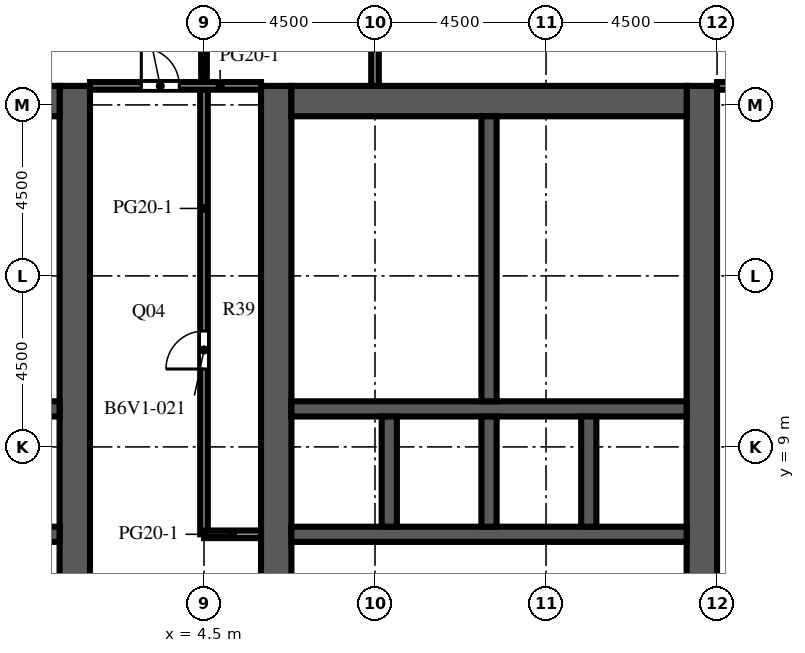
"""IFC4 building model, lengths in metres.
Left out: names, types, materials, properties, quantities, classifications, styles, units other than length and angle.
Written with IfcOpenShell. Run it as: python <this file> out.ifc"""

import sys

from ifc_helpers import new_model, si_unit, direction, frame, frame_2d, origin, place, context, subcontext, project, spatial, rectangle, extrude, element, fill, save


model = new_model("IFC4")
c1 = context("Model", 3, precision=1e-05, world=origin(), true_north=direction((0.0, 1.0)))
c2 = subcontext(c1, "Body", "Model", "MODEL_VIEW")
j1 = project(units=[si_unit("LENGTHUNIT", "METRE"), si_unit("PLANEANGLEUNIT", "RADIAN")], contexts=[c1])
p1 = place(None, origin())
s1 = spatial("IfcSite", under=j1, at=p1, CompositionType="ELEMENT")
p2 = place(p1, origin())
s2 = spatial("IfcBuilding", under=s1, at=p2, CompositionType="ELEMENT")
p3 = place(p2, frame((0.0, 0.0, 203.8)))
s3 = spatial("IfcBuildingStorey", under=s2, at=p3, CompositionType="ELEMENT", Elevation=203.8)
p4 = place(p3, frame((1.1, -9.0, 0.0), z_axis=(0.0, 0.0, 1.0), x_axis=(0.0, 1.0, 0.0)))
e1 = element("IfcWall", 1, at=p4, inside=s3, PredefinedType="SHEAR", context=c2, shape_type="SweptSolid", body=[
    extrude(rectangle(XDim=27.5, YDim=0.8, at=frame_2d((13.75, 0.0))), origin(), (0.0, 0.0, 1.0), 4.1),
])
p5 = place(p4, frame((12.55, 0.0, 0.0)))
e2 = element("IfcOpeningElement", 2, at=p5, cuts=e1, PredefinedType="OPENING", context=c2, shape_type="SweptSolid", body=[
    extrude(rectangle(XDim=2.4, YDim=2.4, at=frame_2d((1.2, 1.2))), frame((0.0, 0.41, 0.0), z_axis=(0.0, -1.0, 0.0), x_axis=(1.0, 0.0, 0.0)), (0.0, 0.0, 1.0), 0.82),
])
p6 = place(p4, frame((3.95, 0.0, 0.0)))
e3 = element("IfcOpeningElement", 3, at=p6, cuts=e1, PredefinedType="OPENING", context=c2, shape_type="SweptSolid", body=[
    extrude(rectangle(XDim=1.2, YDim=2.1, at=frame_2d((0.6, 1.05))), frame((0.0, 0.41, 0.0), z_axis=(0.0, -1.0, 0.0), x_axis=(1.0, 0.0, 0.0)), (0.0, 0.0, 1.0), 0.82),
])
p7 = place(p4, frame((22.35, 0.0, 0.0)))
e4 = element("IfcOpeningElement", 4, at=p7, cuts=e1, PredefinedType="OPENING", context=c2, shape_type="SweptSolid", body=[
    extrude(rectangle(XDim=1.2, YDim=2.1, at=frame_2d((0.6, 1.05))), frame((0.0, 0.41, 0.0), z_axis=(0.0, -1.0, 0.0), x_axis=(1.0, 0.0, 0.0)), (0.0, 0.0, 1.0), 0.82),
])
p8 = place(p3, frame((-9.7, 18.1, 0.0), z_axis=(0.0, 0.0, 1.0), x_axis=(1.0, 0.0, 0.0)))
e5 = element("IfcWall", 5, at=p8, inside=s3, PredefinedType="SHEAR", context=c2, shape_type="SweptSolid", body=[
    extrude(rectangle(XDim=10.4, YDim=0.8, at=frame_2d((5.2, 0.0))), origin(), (0.0, 0.0, 1.0), 4.1),
])
p9 = place(p3, frame((-9.7, 6.7, 0.0), z_axis=(0.0, 0.0, 1.0), x_axis=(1.0, 0.0, 0.0)))
e6 = element("IfcWall", 6, at=p9, inside=s3, PredefinedType="SHEAR", context=c2, shape_type="SweptSolid", body=[
    extrude(rectangle(XDim=10.4, YDim=0.4, at=frame_2d((5.2, 0.0))), origin(), (0.0, 0.0, 1.0), 4.1),
])
p10 = place(p9, frame((3.337, 0.0, 0.0)))
e7 = element("IfcOpeningElement", 7, at=p10, cuts=e6, PredefinedType="OPENING", context=c2, shape_type="SweptSolid", body=[
    extrude(rectangle(XDim=1.1, YDim=2.1, at=frame_2d((0.55, 1.05))), frame((0.0, 0.21, 0.0), z_axis=(0.0, -1.0, 0.0), x_axis=(1.0, 0.0, 0.0)), (0.0, 0.0, 1.0), 0.42),
])
p11 = place(p9, frame((5.962, 0.0, 0.0)))
e8 = element("IfcOpeningElement", 8, at=p11, cuts=e6, PredefinedType="OPENING", context=c2, shape_type="SweptSolid", body=[
    extrude(rectangle(XDim=1.1, YDim=2.1, at=frame_2d((0.55, 1.05))), frame((0.0, 0.21, 0.0), z_axis=(0.0, -1.0, 0.0), x_axis=(1.0, 0.0, 0.0)), (0.0, 0.0, 1.0), 0.42),
])
p12 = place(p9, frame((8.663, 0.0, 0.0)))
e9 = element("IfcOpeningElement", 9, at=p12, cuts=e6, PredefinedType="OPENING", context=c2, shape_type="SweptSolid", body=[
    extrude(rectangle(XDim=1.1, YDim=2.1, at=frame_2d((0.55, 1.05))), frame((0.0, 0.21, 0.0), z_axis=(0.0, -1.0, 0.0), x_axis=(1.0, 0.0, 0.0)), (0.0, 0.0, 1.0), 0.42),
])
p13 = place(p9, frame((0.688, 0.0, 0.0)))
e10 = element("IfcOpeningElement", 10, at=p13, cuts=e6, PredefinedType="OPENING", context=c2, shape_type="SweptSolid", body=[
    extrude(rectangle(XDim=1.0, YDim=2.1, at=frame_2d((0.5, 1.05))), frame((0.0, 0.21, 0.0), z_axis=(0.0, -1.0, 0.0), x_axis=(1.0, 0.0, 0.0)), (0.0, 0.0, 1.0), 0.42),
])
p14 = place(p3, frame((-9.7, 10.0, 0.0), z_axis=(0.0, 0.0, 1.0), x_axis=(1.0, 0.0, 0.0)))
e11 = element("IfcWall", 11, at=p14, inside=s3, PredefinedType="SHEAR", context=c2, shape_type="SweptSolid", body=[
    extrude(rectangle(XDim=10.4, YDim=0.4, at=frame_2d((5.2, 0.0))), origin(), (0.0, 0.0, 1.0), 4.1),
])
p15 = place(p3, frame((6.4, -9.0, 0.0), z_axis=(0.0, 0.0, 1.0), x_axis=(0.0, 1.0, 0.0)))
e12 = element("IfcWall", 12, at=p15, inside=s3, PredefinedType="SHEAR", context=c2, shape_type="SweptSolid", body=[
    extrude(rectangle(XDim=27.5, YDim=0.8, at=frame_2d((13.75, 0.0))), origin(), (0.0, 0.0, 1.0), 4.1),
])
p16 = place(p15, frame((12.55, 0.0, 0.0)))
e13 = element("IfcOpeningElement", 13, at=p16, cuts=e12, PredefinedType="OPENING", context=c2, shape_type="SweptSolid", body=[
    extrude(rectangle(XDim=2.4, YDim=2.4, at=frame_2d((1.2, 1.2))), frame((0.0, 0.41, 0.0), z_axis=(0.0, -1.0, 0.0), x_axis=(1.0, 0.0, 0.0)), (0.0, 0.0, 1.0), 0.82),
])
p17 = place(p15, frame((3.95, 0.0, 0.0)))
e14 = element("IfcOpeningElement", 14, at=p17, cuts=e12, PredefinedType="OPENING", context=c2, shape_type="SweptSolid", body=[
    extrude(rectangle(XDim=1.2, YDim=2.1, at=frame_2d((0.6, 1.05))), frame((0.0, 0.41, 0.0), z_axis=(0.0, -1.0, 0.0), x_axis=(1.0, 0.0, 0.0)), (0.0, 0.0, 1.0), 0.82),
])
p18 = place(p15, frame((22.35, 0.0, 0.0)))
e15 = element("IfcOpeningElement", 15, at=p18, cuts=e12, PredefinedType="OPENING", context=c2, shape_type="SweptSolid", body=[
    extrude(rectangle(XDim=1.2, YDim=2.1, at=frame_2d((0.6, 1.05))), frame((0.0, 0.41, 0.0), z_axis=(0.0, -1.0, 0.0), x_axis=(1.0, 0.0, 0.0)), (0.0, 0.0, 1.0), 0.82),
])
p19 = place(p3, frame((17.6, -9.0, 0.0), z_axis=(0.0, 0.0, 1.0), x_axis=(0.0, 1.0, 0.0)))
e16 = element("IfcWall", 16, at=p19, inside=s3, PredefinedType="SHEAR", context=c2, shape_type="SweptSolid", body=[
    extrude(rectangle(XDim=27.5, YDim=0.8, at=frame_2d((13.75, 0.0))), origin(), (0.0, 0.0, 1.0), 4.1),
])
p20 = place(p19, frame((12.55, 0.0, 0.0)))
e17 = element("IfcOpeningElement", 17, at=p20, cuts=e16, PredefinedType="OPENING", context=c2, shape_type="SweptSolid", body=[
    extrude(rectangle(XDim=2.4, YDim=2.4, at=frame_2d((1.2, 1.2))), frame((0.0, 0.41, 0.0), z_axis=(0.0, -1.0, 0.0), x_axis=(1.0, 0.0, 0.0)), (0.0, 0.0, 1.0), 0.82),
])
p21 = place(p19, frame((6.825, 0.0, 0.0)))
e18 = element("IfcOpeningElement", 18, at=p21, cuts=e16, PredefinedType="OPENING", context=c2, shape_type="SweptSolid", body=[
    extrude(rectangle(XDim=1.2, YDim=2.1, at=frame_2d((0.6, 1.05))), frame((0.0, 0.41, 0.0), z_axis=(0.0, -1.0, 0.0), x_axis=(1.0, 0.0, 0.0)), (0.0, 0.0, 1.0), 0.82),
])
p22 = place(p19, frame((19.475, 0.0, 0.0)))
e19 = element("IfcOpeningElement", 19, at=p22, cuts=e16, PredefinedType="OPENING", context=c2, shape_type="SweptSolid", body=[
    extrude(rectangle(XDim=1.2, YDim=2.1, at=frame_2d((0.6, 1.05))), frame((0.0, 0.41, 0.0), z_axis=(0.0, -1.0, 0.0), x_axis=(1.0, 0.0, 0.0)), (0.0, 0.0, 1.0), 0.82),
])
p23 = place(p3, frame((6.8, 18.1, 0.0), z_axis=(0.0, 0.0, 1.0), x_axis=(1.0, 0.0, 0.0)))
e20 = element("IfcWall", 20, at=p23, inside=s3, PredefinedType="SHEAR", context=c2, shape_type="SweptSolid", body=[
    extrude(rectangle(XDim=10.4, YDim=0.8, at=frame_2d((5.2, 0.0))), origin(), (0.0, 0.0, 1.0), 4.1),
])
p24 = place(p3, frame((6.8, 6.7, 0.0), z_axis=(0.0, 0.0, 1.0), x_axis=(1.0, 0.0, 0.0)))
e21 = element("IfcWall", 21, at=p24, inside=s3, PredefinedType="SHEAR", context=c2, shape_type="SweptSolid", body=[
    extrude(rectangle(XDim=10.4, YDim=0.4, at=frame_2d((5.2, 0.0))), origin(), (0.0, 0.0, 1.0), 4.1),
])
p25 = place(p24, frame((3.337, 0.0, 0.0)))
e22 = element("IfcOpeningElement", 22, at=p25, cuts=e21, PredefinedType="OPENING", context=c2, shape_type="SweptSolid", body=[
    extrude(rectangle(XDim=1.1, YDim=2.1, at=frame_2d((0.55, 1.05))), frame((0.0, 0.21, 0.0), z_axis=(0.0, -1.0, 0.0), x_axis=(1.0, 0.0, 0.0)), (0.0, 0.0, 1.0), 0.42),
])
p26 = place(p24, frame((5.962, 0.0, 0.0)))
e23 = element("IfcOpeningElement", 23, at=p26, cuts=e21, PredefinedType="OPENING", context=c2, shape_type="SweptSolid", body=[
    extrude(rectangle(XDim=1.1, YDim=2.1, at=frame_2d((0.55, 1.05))), frame((0.0, 0.21, 0.0), z_axis=(0.0, -1.0, 0.0), x_axis=(1.0, 0.0, 0.0)), (0.0, 0.0, 1.0), 0.42),
])
p27 = place(p24, frame((8.663, 0.0, 0.0)))
e24 = element("IfcOpeningElement", 24, at=p27, cuts=e21, PredefinedType="OPENING", context=c2, shape_type="SweptSolid", body=[
    extrude(rectangle(XDim=1.1, YDim=2.1, at=frame_2d((0.55, 1.05))), frame((0.0, 0.21, 0.0), z_axis=(0.0, -1.0, 0.0), x_axis=(1.0, 0.0, 0.0)), (0.0, 0.0, 1.0), 0.42),
])
p28 = place(p24, frame((0.688, 0.0, 0.0)))
e25 = element("IfcOpeningElement", 25, at=p28, cuts=e21, PredefinedType="OPENING", context=c2, shape_type="SweptSolid", body=[
    extrude(rectangle(XDim=1.0, YDim=2.1, at=frame_2d((0.5, 1.05))), frame((0.0, 0.21, 0.0), z_axis=(0.0, -1.0, 0.0), x_axis=(1.0, 0.0, 0.0)), (0.0, 0.0, 1.0), 0.42),
])
p29 = place(p3, frame((6.8, 10.0, 0.0), z_axis=(0.0, 0.0, 1.0), x_axis=(1.0, 0.0, 0.0)))
e26 = element("IfcWall", 26, at=p29, inside=s3, PredefinedType="SHEAR", context=c2, shape_type="SweptSolid", body=[
    extrude(rectangle(XDim=10.4, YDim=0.4, at=frame_2d((5.2, 0.0))), origin(), (0.0, 0.0, 1.0), 4.1),
])
for number, where, z_axis, x_axis in (
    (27, (9.375, 6.9, 0.0), (0.0, 0.0, 1.0), (0.0, 1.0, 0.0)),
    (28, (12.0, 6.9, 0.0), (0.0, 0.0, 1.0), (0.0, 1.0, 0.0)),
    (29, (14.625, 6.9, 0.0), (0.0, 0.0, 1.0), (0.0, 1.0, 0.0)),
):
    element("IfcWall", number, at=place(p3, frame(where, z_axis=z_axis, x_axis=x_axis)), inside=s3, PredefinedType="SHEAR", context=c2, shape_type="SweptSolid", body=[
        extrude(rectangle(XDim=2.9, YDim=0.4, at=frame_2d((1.45, 0.0))), origin(), (0.0, 0.0, 1.0), 4.1),
    ])
p30 = place(p3, frame((12.0, 10.2, 0.0), z_axis=(0.0, 0.0, 1.0), x_axis=(0.0, 1.0, 0.0)))
e30 = element("IfcWall", 30, at=p30, inside=s3, PredefinedType="SHEAR", context=c2, shape_type="SweptSolid", body=[
    extrude(rectangle(XDim=7.5, YDim=0.4, at=frame_2d((3.75, 0.0))), origin(), (0.0, 0.0, 1.0), 4.1),
])
p31 = place(p3, frame((8.2, 10.2, 0.0), z_axis=(0.0, 0.0, 1.0), x_axis=(0.0, 1.0, 0.0)))
e31 = element("IfcWall", 31, at=p31, inside=s3, PredefinedType="PARTITIONING", context=c2, shape_type="SweptSolid", body=[
    extrude(rectangle(XDim=2.25, YDim=0.1, at=frame_2d((1.125, 0.0))), origin(), (0.0, 0.0, 1.0), 3.65),
])
p32 = place(p31, frame((0.625, 0.0, 0.0)))
e32 = element("IfcOpeningElement", 32, at=p32, cuts=e31, PredefinedType="OPENING", context=c2, shape_type="SweptSolid", body=[
    extrude(rectangle(XDim=1.0, YDim=2.1, at=frame_2d((0.5, 1.05))), frame((0.0, 0.06, 0.0), z_axis=(0.0, -1.0, 0.0), x_axis=(1.0, 0.0, 0.0)), (0.0, 0.0, 1.0), 0.12),
])
p33 = place(p3, frame((8.2, 12.45, 0.0), z_axis=(0.0, 0.0, 1.0), x_axis=(0.0, 1.0, 0.0)))
e33 = element("IfcWall", 33, at=p33, inside=s3, PredefinedType="PARTITIONING", context=c2, shape_type="SweptSolid", body=[
    extrude(rectangle(XDim=2.4, YDim=0.1, at=frame_2d((1.2, 0.0))), origin(), (0.0, 0.0, 1.0), 3.65),
])
p34 = place(p33, frame((0.7, 0.0, 0.0)))
e34 = element("IfcOpeningElement", 34, at=p34, cuts=e33, PredefinedType="OPENING", context=c2, shape_type="SweptSolid", body=[
    extrude(rectangle(XDim=1.0, YDim=2.1, at=frame_2d((0.5, 1.05))), frame((0.0, 0.06, 0.0), z_axis=(0.0, -1.0, 0.0), x_axis=(1.0, 0.0, 0.0)), (0.0, 0.0, 1.0), 0.12),
])
p35 = place(p3, frame((8.2, 14.85, 0.0), z_axis=(0.0, 0.0, 1.0), x_axis=(0.0, 1.0, 0.0)))
e35 = element("IfcWall", 35, at=p35, inside=s3, PredefinedType="PARTITIONING", context=c2, shape_type="SweptSolid", body=[
    extrude(rectangle(XDim=2.85, YDim=0.1, at=frame_2d((1.425, 0.0))), origin(), (0.0, 0.0, 1.0), 3.65),
])
p36 = place(p35, frame((0.925, 0.0, 0.0)))
e36 = element("IfcOpeningElement", 36, at=p36, cuts=e35, PredefinedType="OPENING", context=c2, shape_type="SweptSolid", body=[
    extrude(rectangle(XDim=1.0, YDim=2.1, at=frame_2d((0.5, 1.05))), frame((0.0, 0.06, 0.0), z_axis=(0.0, -1.0, 0.0), x_axis=(1.0, 0.0, 0.0)), (0.0, 0.0, 1.0), 0.12),
])
for number, where, z_axis, x_axis in (
    (37, (8.2, 12.45, 0.0), (0.0, 0.0, 1.0), (1.0, 0.0, 0.0)),
    (38, (8.2, 14.85, 0.0), (0.0, 0.0, 1.0), (1.0, 0.0, 0.0)),
):
    element("IfcWall", number, at=place(p3, frame(where, z_axis=z_axis, x_axis=x_axis)), inside=s3, PredefinedType="PARTITIONING", context=c2, shape_type="SweptSolid", body=[
        extrude(rectangle(XDim=3.6, YDim=0.1, at=frame_2d((1.8, 0.0))), origin(), (0.0, 0.0, 1.0), 3.65),
    ])
p37 = place(p3, frame((4.5, 26.5, 0.0), z_axis=(0.0, 0.0, 1.0), x_axis=(0.0, -1.0, 0.0)))
e39 = element("IfcWall", 39, at=p37, inside=s3, PredefinedType="PARTITIONING", context=c2, shape_type="SweptSolid", body=[
    extrude(rectangle(XDim=8.0, YDim=0.15, at=frame_2d((4.0, 0.0))), origin(), (0.0, 0.0, 1.0), 3.65),
])
p38 = place(p37, frame((2.15, 0.0, 0.0)))
e40 = element("IfcOpeningElement", 40, at=p38, cuts=e39, PredefinedType="OPENING", context=c2, shape_type="SweptSolid", body=[
    extrude(rectangle(XDim=1.0, YDim=2.1, at=frame_2d((0.5, 1.05))), frame((0.0, 0.085, 0.0), z_axis=(0.0, -1.0, 0.0), x_axis=(1.0, 0.0, 0.0)), (0.0, 0.0, 1.0), 0.17),
])
p39 = place(p3, frame((4.5, 18.5, 0.0), z_axis=(0.0, 0.0, 1.0), x_axis=(0.0, -1.0, 0.0)))
e41 = element("IfcWall", 41, at=p39, inside=s3, PredefinedType="PARTITIONING", context=c2, shape_type="SweptSolid", body=[
    extrude(rectangle(XDim=11.8, YDim=0.2, at=frame_2d((5.9, 0.0))), origin(), (0.0, 0.0, 1.0), 3.65),
])
p40 = place(p39, frame((6.45, 0.0, 0.0)))
e42 = element("IfcOpeningElement", 42, at=p40, cuts=e41, PredefinedType="OPENING", context=c2, shape_type="SweptSolid", body=[
    extrude(rectangle(XDim=1.0, YDim=2.1, at=frame_2d((0.5, 1.05))), frame((0.0, 0.11, 0.0), z_axis=(0.0, -1.0, 0.0), x_axis=(1.0, 0.0, 0.0)), (0.0, 0.0, 1.0), 0.22),
])
p41 = place(p3, frame((9.0, 18.5, 0.0), z_axis=(0.0, 0.0, 1.0), x_axis=(0.0, 1.0, 0.0)))
e43 = element("IfcWall", 43, at=p41, inside=s3, PredefinedType="PARTITIONING", context=c2, shape_type="SweptSolid", body=[
    extrude(rectangle(XDim=3.4, YDim=0.2, at=frame_2d((1.7, 0.0))), origin(), (0.0, 0.0, 1.0), 3.65),
])
p42 = place(p3, frame((4.5, 6.7, 0.0), z_axis=(0.0, 0.0, 1.0), x_axis=(1.0, 0.0, 0.0)))
e44 = element("IfcWall", 44, at=p42, inside=s3, PredefinedType="PARTITIONING", context=c2, shape_type="SweptSolid", body=[
    extrude(rectangle(XDim=1.5, YDim=0.2, at=frame_2d((0.75, 0.0))), origin(), (0.0, 0.0, 1.0), 3.65),
])
p43 = place(p3, frame((1.5, 18.5, 0.0), z_axis=(0.0, 0.0, 1.0), x_axis=(1.0, 0.0, 0.0)))
e45 = element("IfcWall", 45, at=p43, inside=s3, PredefinedType="PARTITIONING", context=c2, shape_type="SweptSolid", body=[
    extrude(rectangle(XDim=4.5, YDim=0.2, at=frame_2d((2.25, 0.0))), origin(), (0.0, 0.0, 1.0), 3.65),
])
p44 = place(p43, frame((1.35, 0.0, 0.0)))
e46 = element("IfcOpeningElement", 46, at=p44, cuts=e45, PredefinedType="OPENING", context=c2, shape_type="SweptSolid", body=[
    extrude(rectangle(XDim=1.0, YDim=2.1, at=frame_2d((0.5, 1.05))), frame((0.0, 0.11, 0.0), z_axis=(0.0, -1.0, 0.0), x_axis=(1.0, 0.0, 0.0)), (0.0, 0.0, 1.0), 0.22),
])
p45 = place(p3, frame((18.0, 18.5, 0.0), z_axis=(0.0, 0.0, 1.0), x_axis=(1.0, 0.0, 0.0)))
e47 = element("IfcWall", 47, at=p45, inside=s3, PredefinedType="PARTITIONING", context=c2, shape_type="SweptSolid", body=[
    extrude(rectangle(XDim=3.0, YDim=0.2, at=frame_2d((1.5, 0.0))), origin(), (0.0, 0.0, 1.0), 3.65),
])
p46 = place(p45, frame((0.6, 0.0, 0.0)))
e48 = element("IfcOpeningElement", 48, at=p46, cuts=e47, PredefinedType="OPENING", context=c2, shape_type="SweptSolid", body=[
    extrude(rectangle(XDim=1.0, YDim=2.1, at=frame_2d((0.5, 1.05))), frame((0.0, 0.11, 0.0), z_axis=(0.0, -1.0, 0.0), x_axis=(1.0, 0.0, 0.0)), (0.0, 0.0, 1.0), 0.22),
])
p47 = place(p25, origin())
e49 = element("IfcDoor", 49, at=p47, inside=s3, OperationType="DOUBLE_DOOR_SLIDING", PredefinedType="DOOR", context=c2, shape_type="SweptSolid", body=[
    extrude(rectangle(XDim=1.1, YDim=2.1, at=frame_2d((0.55, 1.05))), frame((0.0, 0.025, 0.0), z_axis=(0.0, -1.0, 0.0), x_axis=(1.0, 0.0, 0.0)), (0.0, 0.0, 1.0), 0.05),
])
fill(e22, e49)
p48 = place(p26, origin())
e50 = element("IfcDoor", 50, at=p48, inside=s3, OperationType="DOUBLE_DOOR_SLIDING", PredefinedType="DOOR", context=c2, shape_type="SweptSolid", body=[
    extrude(rectangle(XDim=1.1, YDim=2.1, at=frame_2d((0.55, 1.05))), frame((0.0, 0.025, 0.0), z_axis=(0.0, -1.0, 0.0), x_axis=(1.0, 0.0, 0.0)), (0.0, 0.0, 1.0), 0.05),
])
fill(e23, e50)
p49 = place(p27, origin())
e51 = element("IfcDoor", 51, at=p49, inside=s3, OperationType="DOUBLE_DOOR_SLIDING", PredefinedType="DOOR", context=c2, shape_type="SweptSolid", body=[
    extrude(rectangle(XDim=1.1, YDim=2.1, at=frame_2d((0.55, 1.05))), frame((0.0, 0.025, 0.0), z_axis=(0.0, -1.0, 0.0), x_axis=(1.0, 0.0, 0.0)), (0.0, 0.0, 1.0), 0.05),
])
fill(e24, e51)
p50 = place(p5, origin())
e52 = element("IfcDoor", 52, at=p50, inside=s3, OperationType="DOUBLE_DOOR_DOUBLE_SWING", PredefinedType="DOOR", context=c2, shape_type="SweptSolid", body=[
    extrude(rectangle(XDim=2.4, YDim=2.4, at=frame_2d((1.2, 1.2))), frame((0.0, 0.025, 0.0), z_axis=(0.0, -1.0, 0.0), x_axis=(1.0, 0.0, 0.0)), (0.0, 0.0, 1.0), 0.05),
])
fill(e2, e52)
p51 = place(p16, origin())
e53 = element("IfcDoor", 53, at=p51, inside=s3, OperationType="DOUBLE_DOOR_DOUBLE_SWING", PredefinedType="DOOR", context=c2, shape_type="SweptSolid", body=[
    extrude(rectangle(XDim=2.4, YDim=2.4, at=frame_2d((1.2, 1.2))), frame((0.0, 0.025, 0.0), z_axis=(0.0, -1.0, 0.0), x_axis=(1.0, 0.0, 0.0)), (0.0, 0.0, 1.0), 0.05),
])
fill(e13, e53)
p52 = place(p20, origin())
e54 = element("IfcDoor", 54, at=p52, inside=s3, OperationType="DOUBLE_DOOR_DOUBLE_SWING", PredefinedType="DOOR", context=c2, shape_type="SweptSolid", body=[
    extrude(rectangle(XDim=2.4, YDim=2.4, at=frame_2d((1.2, 1.2))), frame((0.0, 0.025, 0.0), z_axis=(0.0, -1.0, 0.0), x_axis=(1.0, 0.0, 0.0)), (0.0, 0.0, 1.0), 0.05),
])
fill(e17, e54)
p53 = place(p22, frame((1.2, 0.0, 0.0), z_axis=(0.0, 0.0, 1.0), x_axis=(-1.0, 0.0, 0.0)))
e55 = element("IfcDoor", 55, at=p53, inside=s3, OperationType="SINGLE_SWING_LEFT", PredefinedType="DOOR", context=c2, shape_type="SweptSolid", body=[
    extrude(rectangle(XDim=1.2, YDim=2.1, at=frame_2d((0.6, 1.05))), frame((0.0, 0.025, 0.0), z_axis=(0.0, -1.0, 0.0), x_axis=(1.0, 0.0, 0.0)), (0.0, 0.0, 1.0), 0.05),
])
fill(e19, e55)
p54 = place(p7, origin())
e56 = element("IfcDoor", 56, at=p54, inside=s3, OperationType="SINGLE_SWING_LEFT", PredefinedType="DOOR", context=c2, shape_type="SweptSolid", body=[
    extrude(rectangle(XDim=1.2, YDim=2.1, at=frame_2d((0.6, 1.05))), frame((0.0, 0.375, 0.0), z_axis=(0.0, -1.0, 0.0), x_axis=(1.0, 0.0, 0.0)), (0.0, 0.0, 1.0), 0.05),
])
fill(e4, e56)
p55 = place(p28, origin())
e57 = element("IfcDoor", 57, at=p55, inside=s3, OperationType="SINGLE_SWING_LEFT", PredefinedType="DOOR", context=c2, shape_type="SweptSolid", body=[
    extrude(rectangle(XDim=1.0, YDim=2.1, at=frame_2d((0.5, 1.05))), frame((0.0, 0.025, 0.0), z_axis=(0.0, -1.0, 0.0), x_axis=(1.0, 0.0, 0.0)), (0.0, 0.0, 1.0), 0.05),
])
fill(e25, e57)
p56 = place(p18, origin())
e58 = element("IfcDoor", 58, at=p56, inside=s3, OperationType="SINGLE_SWING_RIGHT", PredefinedType="DOOR", context=c2, shape_type="SweptSolid", body=[
    extrude(rectangle(XDim=1.2, YDim=2.1, at=frame_2d((0.6, 1.05))), frame((0.0, -0.325, 0.0), z_axis=(0.0, -1.0, 0.0), x_axis=(1.0, 0.0, 0.0)), (0.0, 0.0, 1.0), 0.05),
])
fill(e15, e58)
p57 = place(p32, origin())
e59 = element("IfcDoor", 59, at=p57, inside=s3, OperationType="SINGLE_SWING_LEFT", PredefinedType="DOOR", context=c2, shape_type="SweptSolid", body=[
    extrude(rectangle(XDim=1.0, YDim=2.1, at=frame_2d((0.5, 1.05))), frame((0.0, 0.025, 0.0), z_axis=(0.0, -1.0, 0.0), x_axis=(1.0, 0.0, 0.0)), (0.0, 0.0, 1.0), 0.05),
])
fill(e32, e59)
p58 = place(p34, origin())
e60 = element("IfcDoor", 60, at=p58, inside=s3, OperationType="SINGLE_SWING_RIGHT", PredefinedType="DOOR", context=c2, shape_type="SweptSolid", body=[
    extrude(rectangle(XDim=1.0, YDim=2.1, at=frame_2d((0.5, 1.05))), frame((0.0, 0.025, 0.0), z_axis=(0.0, -1.0, 0.0), x_axis=(1.0, 0.0, 0.0)), (0.0, 0.0, 1.0), 0.05),
])
fill(e34, e60)
p59 = place(p36, origin())
e61 = element("IfcDoor", 61, at=p59, inside=s3, OperationType="SINGLE_SWING_LEFT", PredefinedType="DOOR", context=c2, shape_type="SweptSolid", body=[
    extrude(rectangle(XDim=1.0, YDim=2.1, at=frame_2d((0.5, 1.05))), frame((0.0, 0.025, 0.0), z_axis=(0.0, -1.0, 0.0), x_axis=(1.0, 0.0, 0.0)), (0.0, 0.0, 1.0), 0.05),
])
fill(e36, e61)
p60 = place(p40, origin())
e62 = element("IfcDoor", 62, at=p60, inside=s3, OperationType="SINGLE_SWING_RIGHT", PredefinedType="DOOR", context=c2, shape_type="SweptSolid", body=[
    extrude(rectangle(XDim=1.0, YDim=2.1, at=frame_2d((0.5, 1.05))), frame((0.0, 0.025, 0.0), z_axis=(0.0, -1.0, 0.0), x_axis=(1.0, 0.0, 0.0)), (0.0, 0.0, 1.0), 0.05),
])
fill(e42, e62)
p61 = place(p44, origin())
e63 = element("IfcDoor", 63, at=p61, inside=s3, OperationType="SINGLE_SWING_LEFT", PredefinedType="DOOR", context=c2, shape_type="SweptSolid", body=[
    extrude(rectangle(XDim=1.0, YDim=2.1, at=frame_2d((0.5, 1.05))), frame((0.0, 0.025, 0.0), z_axis=(0.0, -1.0, 0.0), x_axis=(1.0, 0.0, 0.0)), (0.0, 0.0, 1.0), 0.05),
])
fill(e46, e63)
save(model, sys.argv[1])
